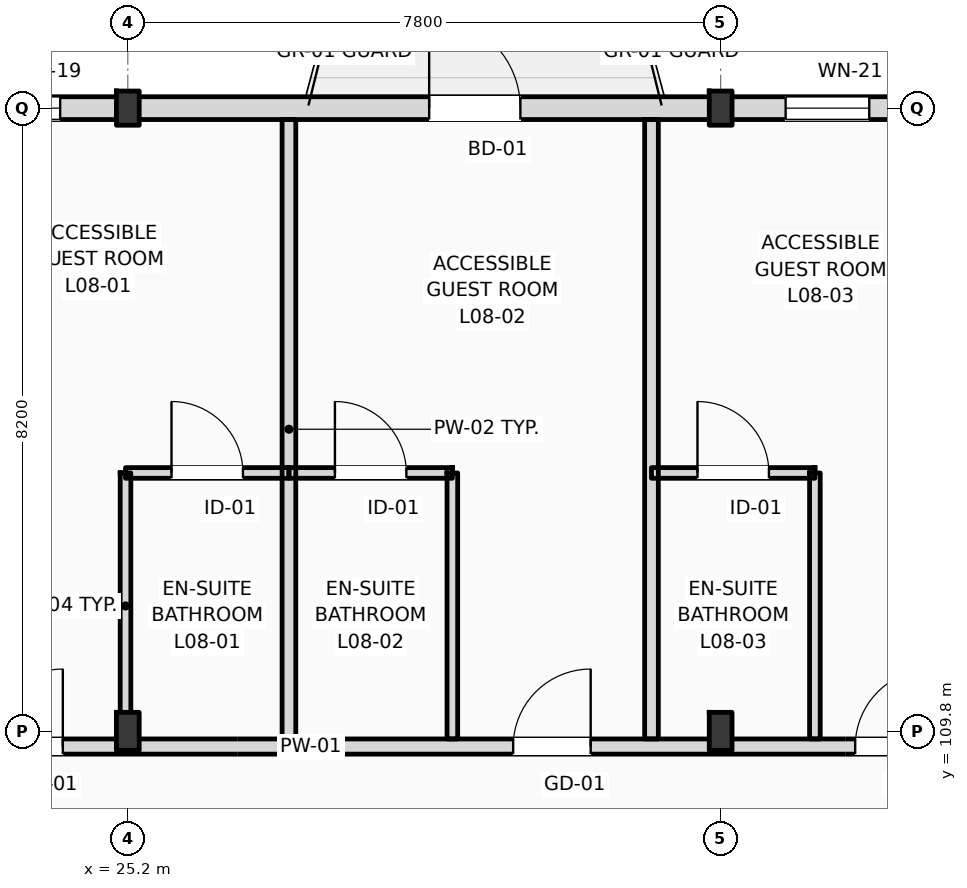
"""IFC4 building model, lengths in metres.
Left out: names, types, materials, properties, quantities, classifications, styles, units other than length and angle.
Written with IfcOpenShell. Run it as: python <this file> out.ifc"""

import sys

from ifc_helpers import new_model, si_unit, direction, frame, frame_2d, origin, origin_2d, place, context, subcontext, project, spatial, rectangle, i_section, extrude, element, fill, save


model = new_model("IFC4")
c1 = context("Model", 3, precision=1e-05, world=origin(), true_north=direction((0.0, 1.0)))
c2 = subcontext(c1, "Body", "Model", "MODEL_VIEW")
j1 = project(units=[si_unit("LENGTHUNIT", "METRE"), si_unit("PLANEANGLEUNIT", "RADIAN")], contexts=[c1])
p1 = place(None, origin())
s1 = spatial("IfcSite", under=j1, at=p1, CompositionType="ELEMENT")
p2 = place(p1, origin())
s2 = spatial("IfcBuilding", under=s1, at=p2, CompositionType="ELEMENT")
p3 = place(p2, frame((0.0, 0.0, 35.4)))
s3 = spatial("IfcBuildingStorey", under=s2, at=p3, CompositionType="ELEMENT", Elevation=35.4)
p4 = place(p3, frame((25.2, 109.8, 0.0), z_axis=(0.0, 0.0, 1.0), x_axis=(1.0, 0.0, 0.0)))
e1 = element("IfcColumn", 1, at=p4, inside=s3, PredefinedType="COLUMN", context=c2, shape_type="SweptSolid", body=[
    extrude(i_section(OverallWidth=0.3, OverallDepth=0.5, WebThickness=0.014, FlangeThickness=0.028, FilletRadius=0.027, at=origin_2d()), origin(), (0.0, 0.0, 1.0), 3.6),
])
p5 = place(p3, frame((25.2, 118.0, 0.0), z_axis=(0.0, 0.0, 1.0), x_axis=(1.0, 0.0, 0.0)))
e2 = element("IfcColumn", 2, at=p5, inside=s3, PredefinedType="COLUMN", context=c2, shape_type="SweptSolid", body=[
    extrude(i_section(OverallWidth=0.3, OverallDepth=0.45, WebThickness=0.014, FlangeThickness=0.026, FilletRadius=0.027, at=origin_2d()), origin(), (0.0, 0.0, 1.0), 3.6),
])
p6 = place(p3, frame((33.0, 109.8, 0.0), z_axis=(0.0, 0.0, 1.0), x_axis=(1.0, 0.0, 0.0)))
e3 = element("IfcColumn", 3, at=p6, inside=s3, PredefinedType="COLUMN", context=c2, shape_type="SweptSolid", body=[
    extrude(i_section(OverallWidth=0.3, OverallDepth=0.5, WebThickness=0.014, FlangeThickness=0.028, FilletRadius=0.027, at=origin_2d()), origin(), (0.0, 0.0, 1.0), 3.6),
])
p7 = place(p3, frame((33.0, 118.0, 0.0), z_axis=(0.0, 0.0, 1.0), x_axis=(1.0, 0.0, 0.0)))
e4 = element("IfcColumn", 4, at=p7, inside=s3, PredefinedType="COLUMN", context=c2, shape_type="SweptSolid", body=[
    extrude(i_section(OverallWidth=0.3, OverallDepth=0.45, WebThickness=0.014, FlangeThickness=0.026, FilletRadius=0.027, at=origin_2d()), origin(), (0.0, 0.0, 1.0), 3.6),
])
p8 = place(p3, frame((22.5, 118.0, 0.0), z_axis=(0.0, 0.0, 1.0), x_axis=(1.0, 0.0, 0.0)))
e5 = element("IfcWall", 5, at=p8, inside=s3, PredefinedType="STANDARD", context=c2, shape_type="SweptSolid", body=[
    extrude(rectangle(XDim=72.9, YDim=0.3, at=frame_2d((36.45, 0.0))), origin(), (0.0, 0.0, 1.0), 2.92),
])
p9 = place(p8, frame((0.91, 0.0, 0.9)))
e6 = element("IfcOpeningElement", 6, at=p9, cuts=e5, PredefinedType="OPENING", context=c2, shape_type="SweptSolid", body=[
    extrude(rectangle(XDim=0.9, YDim=1.84, at=frame_2d((0.45, 0.92))), frame((0.0, 0.16, 0.0), z_axis=(0.0, -1.0, 0.0), x_axis=(1.0, 0.0, 0.0)), (0.0, 0.0, 1.0), 0.32),
])
p10 = place(p8, frame((6.665, 0.0, 0.0)))
e7 = element("IfcOpeningElement", 7, at=p10, cuts=e5, PredefinedType="OPENING", context=c2, shape_type="SweptSolid", body=[
    extrude(rectangle(XDim=1.2, YDim=2.25, at=frame_2d((0.6, 1.125))), frame((0.0, 0.16, 0.0), z_axis=(0.0, -1.0, 0.0), x_axis=(1.0, 0.0, 0.0)), (0.0, 0.0, 1.0), 0.32),
])
p11 = place(p8, frame((11.355, 0.0, 0.9)))
e8 = element("IfcOpeningElement", 8, at=p11, cuts=e5, PredefinedType="OPENING", context=c2, shape_type="SweptSolid", body=[
    extrude(rectangle(XDim=1.1, YDim=1.5, at=frame_2d((0.55, 0.75))), frame((0.0, 0.16, 0.0), z_axis=(0.0, -1.0, 0.0), x_axis=(1.0, 0.0, 0.0)), (0.0, 0.0, 1.0), 0.32),
])
p12 = place(p8, frame((15.58, 0.0, 0.9)))
e9 = element("IfcOpeningElement", 9, at=p12, cuts=e5, PredefinedType="OPENING", context=c2, shape_type="SweptSolid", body=[
    extrude(rectangle(XDim=1.25, YDim=1.6, at=frame_2d((0.625, 0.8))), frame((0.0, 0.16, 0.0), z_axis=(0.0, -1.0, 0.0), x_axis=(1.0, 0.0, 0.0)), (0.0, 0.0, 1.0), 0.32),
])
p13 = place(p8, frame((21.08, 0.0, 0.0)))
e10 = element("IfcOpeningElement", 10, at=p13, cuts=e5, PredefinedType="OPENING", context=c2, shape_type="SweptSolid", body=[
    extrude(rectangle(XDim=1.2, YDim=2.25, at=frame_2d((0.6, 1.125))), frame((0.0, 0.16, 0.0), z_axis=(0.0, -1.0, 0.0), x_axis=(1.0, 0.0, 0.0)), (0.0, 0.0, 1.0), 0.32),
])
p14 = place(p8, frame((23.54, 0.0, 0.0)))
e11 = element("IfcOpeningElement", 11, at=p14, cuts=e5, PredefinedType="OPENING", context=c2, shape_type="SweptSolid", body=[
    extrude(rectangle(XDim=1.2, YDim=2.25, at=frame_2d((0.6, 1.125))), frame((0.0, 0.16, 0.0), z_axis=(0.0, -1.0, 0.0), x_axis=(1.0, 0.0, 0.0)), (0.0, 0.0, 1.0), 0.32),
])
p15 = place(p8, frame((28.83, 0.0, 0.9)))
e12 = element("IfcOpeningElement", 12, at=p15, cuts=e5, PredefinedType="OPENING", context=c2, shape_type="SweptSolid", body=[
    extrude(rectangle(XDim=1.75, YDim=1.84, at=frame_2d((0.875, 0.92))), frame((0.0, 0.16, 0.0), z_axis=(0.0, -1.0, 0.0), x_axis=(1.0, 0.0, 0.0)), (0.0, 0.0, 1.0), 0.32),
])
p16 = place(p8, frame((34.805, 0.0, 0.9)))
e13 = element("IfcOpeningElement", 13, at=p16, cuts=e5, PredefinedType="OPENING", context=c2, shape_type="SweptSolid", body=[
    extrude(rectangle(XDim=1.35, YDim=1.84, at=frame_2d((0.675, 0.92))), frame((0.0, 0.16, 0.0), z_axis=(0.0, -1.0, 0.0), x_axis=(1.0, 0.0, 0.0)), (0.0, 0.0, 1.0), 0.32),
])
p17 = place(p8, frame((38.105, 0.0, 0.0)))
e14 = element("IfcOpeningElement", 14, at=p17, cuts=e5, PredefinedType="OPENING", context=c2, shape_type="SweptSolid", body=[
    extrude(rectangle(XDim=1.2, YDim=2.25, at=frame_2d((0.6, 1.125))), frame((0.0, 0.16, 0.0), z_axis=(0.0, -1.0, 0.0), x_axis=(1.0, 0.0, 0.0)), (0.0, 0.0, 1.0), 0.32),
])
p18 = place(p8, frame((42.505, 0.0, 0.9)))
e15 = element("IfcOpeningElement", 15, at=p18, cuts=e5, PredefinedType="OPENING", context=c2, shape_type="SweptSolid", body=[
    extrude(rectangle(XDim=2.6, YDim=1.84, at=frame_2d((1.3, 0.92))), frame((0.0, 0.16, 0.0), z_axis=(0.0, -1.0, 0.0), x_axis=(1.0, 0.0, 0.0)), (0.0, 0.0, 1.0), 0.32),
])
p19 = place(p8, frame((46.2, 0.0, 0.9)))
e16 = element("IfcOpeningElement", 16, at=p19, cuts=e5, PredefinedType="OPENING", context=c2, shape_type="SweptSolid", body=[
    extrude(rectangle(XDim=1.8, YDim=1.84, at=frame_2d((0.9, 0.92))), frame((0.0, 0.16, 0.0), z_axis=(0.0, -1.0, 0.0), x_axis=(1.0, 0.0, 0.0)), (0.0, 0.0, 1.0), 0.32),
])
p20 = place(p8, frame((52.565, 0.0, 0.0)))
e17 = element("IfcOpeningElement", 17, at=p20, cuts=e5, PredefinedType="OPENING", context=c2, shape_type="SweptSolid", body=[
    extrude(rectangle(XDim=1.2, YDim=2.25, at=frame_2d((0.6, 1.125))), frame((0.0, 0.16, 0.0), z_axis=(0.0, -1.0, 0.0), x_axis=(1.0, 0.0, 0.0)), (0.0, 0.0, 1.0), 0.32),
])
p21 = place(p8, frame((55.305, 0.0, 0.9)))
e18 = element("IfcOpeningElement", 18, at=p21, cuts=e5, PredefinedType="OPENING", context=c2, shape_type="SweptSolid", body=[
    extrude(rectangle(XDim=1.2, YDim=1.8, at=frame_2d((0.6, 0.9))), frame((0.0, 0.16, 0.0), z_axis=(0.0, -1.0, 0.0), x_axis=(1.0, 0.0, 0.0)), (0.0, 0.0, 1.0), 0.32),
])
p22 = place(p8, frame((60.53, 0.0, 0.9)))
e19 = element("IfcOpeningElement", 19, at=p22, cuts=e5, PredefinedType="OPENING", context=c2, shape_type="SweptSolid", body=[
    extrude(rectangle(XDim=1.35, YDim=1.84, at=frame_2d((0.675, 0.92))), frame((0.0, 0.16, 0.0), z_axis=(0.0, -1.0, 0.0), x_axis=(1.0, 0.0, 0.0)), (0.0, 0.0, 1.0), 0.32),
])
p23 = place(p8, frame((65.955, 0.0, 0.9)))
e20 = element("IfcOpeningElement", 20, at=p23, cuts=e5, PredefinedType="OPENING", context=c2, shape_type="SweptSolid", body=[
    extrude(rectangle(XDim=1.35, YDim=1.84, at=frame_2d((0.675, 0.92))), frame((0.0, 0.16, 0.0), z_axis=(0.0, -1.0, 0.0), x_axis=(1.0, 0.0, 0.0)), (0.0, 0.0, 1.0), 0.32),
])
p24 = place(p8, frame((69.335, 0.0, 0.9)))
e21 = element("IfcOpeningElement", 21, at=p24, cuts=e5, PredefinedType="OPENING", context=c2, shape_type="SweptSolid", body=[
    extrude(rectangle(XDim=1.65, YDim=1.84, at=frame_2d((0.825, 0.92))), frame((0.0, 0.16, 0.0), z_axis=(0.0, -1.0, 0.0), x_axis=(1.0, 0.0, 0.0)), (0.0, 0.0, 1.0), 0.32),
])
p25 = place(p3, frame((10.65, 109.6, 0.0), z_axis=(0.0, 0.0, 1.0), x_axis=(1.0, 0.0, 0.0)))
e22 = element("IfcWall", 22, at=p25, inside=s3, PredefinedType="PARTITIONING", context=c2, shape_type="SweptSolid", body=[
    extrude(rectangle(XDim=84.61, YDim=0.2, at=frame_2d((42.305, 0.0))), origin(), (0.0, 0.0, 1.0), 2.82),
])
p26 = place(p25, frame((12.675, 0.0, 0.0)))
e23 = element("IfcOpeningElement", 23, at=p26, cuts=e22, PredefinedType="OPENING", context=c2, shape_type="SweptSolid", body=[
    extrude(rectangle(XDim=1.02, YDim=2.2, at=frame_2d((0.51, 1.1))), frame((0.0, 0.11, 0.0), z_axis=(0.0, -1.0, 0.0), x_axis=(1.0, 0.0, 0.0)), (0.0, 0.0, 1.0), 0.22),
])
p27 = place(p25, frame((19.62, 0.0, 0.0)))
e24 = element("IfcOpeningElement", 24, at=p27, cuts=e22, PredefinedType="OPENING", context=c2, shape_type="SweptSolid", body=[
    extrude(rectangle(XDim=1.02, YDim=2.2, at=frame_2d((0.51, 1.1))), frame((0.0, 0.11, 0.0), z_axis=(0.0, -1.0, 0.0), x_axis=(1.0, 0.0, 0.0)), (0.0, 0.0, 1.0), 0.22),
])
p28 = place(p25, frame((24.12, 0.0, 0.0)))
e25 = element("IfcOpeningElement", 25, at=p28, cuts=e22, PredefinedType="OPENING", context=c2, shape_type="SweptSolid", body=[
    extrude(rectangle(XDim=1.02, YDim=2.2, at=frame_2d((0.51, 1.1))), frame((0.0, 0.11, 0.0), z_axis=(0.0, -1.0, 0.0), x_axis=(1.0, 0.0, 0.0)), (0.0, 0.0, 1.0), 0.22),
])
p29 = place(p25, frame((26.47, 0.0, 0.0)))
e26 = element("IfcOpeningElement", 26, at=p29, cuts=e22, PredefinedType="OPENING", context=c2, shape_type="SweptSolid", body=[
    extrude(rectangle(XDim=1.02, YDim=2.2, at=frame_2d((0.51, 1.1))), frame((0.0, 0.11, 0.0), z_axis=(0.0, -1.0, 0.0), x_axis=(1.0, 0.0, 0.0)), (0.0, 0.0, 1.0), 0.22),
])
p30 = place(p25, frame((33.15, 0.0, 0.0)))
e27 = element("IfcOpeningElement", 27, at=p30, cuts=e22, PredefinedType="OPENING", context=c2, shape_type="SweptSolid", body=[
    extrude(rectangle(XDim=0.96, YDim=2.2, at=frame_2d((0.48, 1.1))), frame((0.0, 0.11, 0.0), z_axis=(0.0, -1.0, 0.0), x_axis=(1.0, 0.0, 0.0)), (0.0, 0.0, 1.0), 0.22),
])
p31 = place(p25, frame((35.5, 0.0, 0.0)))
e28 = element("IfcOpeningElement", 28, at=p31, cuts=e22, PredefinedType="OPENING", context=c2, shape_type="SweptSolid", body=[
    extrude(rectangle(XDim=0.96, YDim=2.2, at=frame_2d((0.48, 1.1))), frame((0.0, 0.11, 0.0), z_axis=(0.0, -1.0, 0.0), x_axis=(1.0, 0.0, 0.0)), (0.0, 0.0, 1.0), 0.22),
])
p32 = place(p25, frame((42.15, 0.0, 0.0)))
e29 = element("IfcOpeningElement", 29, at=p32, cuts=e22, PredefinedType="OPENING", context=c2, shape_type="SweptSolid", body=[
    extrude(rectangle(XDim=0.96, YDim=2.2, at=frame_2d((0.48, 1.1))), frame((0.0, 0.11, 0.0), z_axis=(0.0, -1.0, 0.0), x_axis=(1.0, 0.0, 0.0)), (0.0, 0.0, 1.0), 0.22),
])
p33 = place(p25, frame((47.15, 0.0, 0.0)))
e30 = element("IfcOpeningElement", 30, at=p33, cuts=e22, PredefinedType="OPENING", context=c2, shape_type="SweptSolid", body=[
    extrude(rectangle(XDim=0.96, YDim=2.2, at=frame_2d((0.48, 1.1))), frame((0.0, 0.11, 0.0), z_axis=(0.0, -1.0, 0.0), x_axis=(1.0, 0.0, 0.0)), (0.0, 0.0, 1.0), 0.22),
])
p34 = place(p25, frame((51.15, 0.0, 0.0)))
e31 = element("IfcOpeningElement", 31, at=p34, cuts=e22, PredefinedType="OPENING", context=c2, shape_type="SweptSolid", body=[
    extrude(rectangle(XDim=0.96, YDim=2.2, at=frame_2d((0.48, 1.1))), frame((0.0, 0.11, 0.0), z_axis=(0.0, -1.0, 0.0), x_axis=(1.0, 0.0, 0.0)), (0.0, 0.0, 1.0), 0.22),
])
p35 = place(p25, frame((55.65, 0.0, 0.0)))
e32 = element("IfcOpeningElement", 32, at=p35, cuts=e22, PredefinedType="OPENING", context=c2, shape_type="SweptSolid", body=[
    extrude(rectangle(XDim=0.96, YDim=2.2, at=frame_2d((0.48, 1.1))), frame((0.0, 0.11, 0.0), z_axis=(0.0, -1.0, 0.0), x_axis=(1.0, 0.0, 0.0)), (0.0, 0.0, 1.0), 0.22),
])
p36 = place(p25, frame((58.0, 0.0, 0.0)))
e33 = element("IfcOpeningElement", 33, at=p36, cuts=e22, PredefinedType="OPENING", context=c2, shape_type="SweptSolid", body=[
    extrude(rectangle(XDim=0.96, YDim=2.2, at=frame_2d((0.48, 1.1))), frame((0.0, 0.11, 0.0), z_axis=(0.0, -1.0, 0.0), x_axis=(1.0, 0.0, 0.0)), (0.0, 0.0, 1.0), 0.22),
])
p37 = place(p25, frame((64.65, 0.0, 0.0)))
e34 = element("IfcOpeningElement", 34, at=p37, cuts=e22, PredefinedType="OPENING", context=c2, shape_type="SweptSolid", body=[
    extrude(rectangle(XDim=0.96, YDim=2.2, at=frame_2d((0.48, 1.1))), frame((0.0, 0.11, 0.0), z_axis=(0.0, -1.0, 0.0), x_axis=(1.0, 0.0, 0.0)), (0.0, 0.0, 1.0), 0.22),
])
p38 = place(p25, frame((66.75, 0.0, 0.0)))
e35 = element("IfcOpeningElement", 35, at=p38, cuts=e22, PredefinedType="OPENING", context=c2, shape_type="SweptSolid", body=[
    extrude(rectangle(XDim=0.96, YDim=2.2, at=frame_2d((0.48, 1.1))), frame((0.0, 0.11, 0.0), z_axis=(0.0, -1.0, 0.0), x_axis=(1.0, 0.0, 0.0)), (0.0, 0.0, 1.0), 0.22),
])
p39 = place(p25, frame((73.65, 0.0, 0.0)))
e36 = element("IfcOpeningElement", 36, at=p39, cuts=e22, PredefinedType="OPENING", context=c2, shape_type="SweptSolid", body=[
    extrude(rectangle(XDim=0.96, YDim=2.2, at=frame_2d((0.48, 1.1))), frame((0.0, 0.11, 0.0), z_axis=(0.0, -1.0, 0.0), x_axis=(1.0, 0.0, 0.0)), (0.0, 0.0, 1.0), 0.22),
])
p40 = place(p25, frame((78.4, 0.0, 0.0)))
e37 = element("IfcOpeningElement", 37, at=p40, cuts=e22, PredefinedType="OPENING", context=c2, shape_type="SweptSolid", body=[
    extrude(rectangle(XDim=0.96, YDim=2.2, at=frame_2d((0.48, 1.1))), frame((0.0, 0.11, 0.0), z_axis=(0.0, -1.0, 0.0), x_axis=(1.0, 0.0, 0.0)), (0.0, 0.0, 1.0), 0.22),
])
p41 = place(p25, frame((80.455, 0.0, 0.0)))
e38 = element("IfcOpeningElement", 38, at=p41, cuts=e22, PredefinedType="OPENING", context=c2, shape_type="SweptSolid", body=[
    extrude(rectangle(XDim=0.96, YDim=2.2, at=frame_2d((0.48, 1.1))), frame((0.0, 0.11, 0.0), z_axis=(0.0, -1.0, 0.0), x_axis=(1.0, 0.0, 0.0)), (0.0, 0.0, 1.0), 0.22),
])
p42 = place(p25, frame((2.716, 0.0, 0.0)))
e39 = element("IfcOpeningElement", 39, at=p42, cuts=e22, PredefinedType="OPENING", context=c2, shape_type="SweptSolid", body=[
    extrude(rectangle(XDim=1.35, YDim=2.25, at=frame_2d((0.675, 1.125))), frame((0.0, 0.11, 0.0), z_axis=(0.0, -1.0, 0.0), x_axis=(1.0, 0.0, 0.0)), (0.0, 0.0, 1.0), 0.22),
])
p43 = place(p25, frame((6.65, 0.0, 0.0)))
e40 = element("IfcOpeningElement", 40, at=p43, cuts=e22, PredefinedType="OPENING", context=c2, shape_type="SweptSolid", body=[
    extrude(rectangle(XDim=1.35, YDim=2.25, at=frame_2d((0.675, 1.125))), frame((0.0, 0.11, 0.0), z_axis=(0.0, -1.0, 0.0), x_axis=(1.0, 0.0, 0.0)), (0.0, 0.0, 1.0), 0.22),
])
p44 = place(p25, frame((10.583, 0.0, 0.0)))
e41 = element("IfcOpeningElement", 41, at=p44, cuts=e22, PredefinedType="OPENING", context=c2, shape_type="SweptSolid", body=[
    extrude(rectangle(XDim=1.35, YDim=2.25, at=frame_2d((0.675, 1.125))), frame((0.0, 0.11, 0.0), z_axis=(0.0, -1.0, 0.0), x_axis=(1.0, 0.0, 0.0)), (0.0, 0.0, 1.0), 0.22),
])
p45 = place(p3, frame((27.32, 109.7, 0.0), z_axis=(0.0, 0.0, 1.0), x_axis=(0.0, 1.0, 0.0)))
e42 = element("IfcWall", 42, at=p45, inside=s3, PredefinedType="PARTITIONING", context=c2, shape_type="SweptSolid", body=[
    extrude(rectangle(XDim=8.15, YDim=0.18, at=frame_2d((4.075, 0.0))), origin(), (0.0, 0.0, 1.0), 3.38),
])
p46 = place(p3, frame((25.17, 109.7, 0.0), z_axis=(0.0, 0.0, 1.0), x_axis=(0.0, 1.0, 0.0)))
e43 = element("IfcWall", 43, at=p46, inside=s3, PredefinedType="PARTITIONING", context=c2, shape_type="SweptSolid", body=[
    extrude(rectangle(XDim=3.5, YDim=0.14, at=frame_2d((1.75, 0.0))), origin(), (0.0, 0.0, 1.0), 3.01),
])
p47 = place(p3, frame((25.17, 113.2, 0.0), z_axis=(0.0, 0.0, 1.0), x_axis=(1.0, 0.0, 0.0)))
e44 = element("IfcWall", 44, at=p47, inside=s3, PredefinedType="PARTITIONING", context=c2, shape_type="SweptSolid", body=[
    extrude(rectangle(XDim=2.15, YDim=0.14, at=frame_2d((1.075, 0.0))), origin(), (0.0, 0.0, 1.0), 3.38),
])
p48 = place(p47, frame((0.605, 0.0, 0.0)))
e45 = element("IfcOpeningElement", 45, at=p48, cuts=e44, PredefinedType="OPENING", context=c2, shape_type="SweptSolid", body=[
    extrude(rectangle(XDim=0.94, YDim=2.15, at=frame_2d((0.47, 1.075))), frame((0.0, 0.08, 0.0), z_axis=(0.0, -1.0, 0.0), x_axis=(1.0, 0.0, 0.0)), (0.0, 0.0, 1.0), 0.16),
])
p49 = place(p3, frame((32.09, 109.7, 0.0), z_axis=(0.0, 0.0, 1.0), x_axis=(0.0, 1.0, 0.0)))
e46 = element("IfcWall", 46, at=p49, inside=s3, PredefinedType="PARTITIONING", context=c2, shape_type="SweptSolid", body=[
    extrude(rectangle(XDim=8.15, YDim=0.18, at=frame_2d((4.075, 0.0))), origin(), (0.0, 0.0, 1.0), 3.38),
])
p50 = place(p3, frame((29.47, 109.7, 0.0), z_axis=(0.0, 0.0, 1.0), x_axis=(0.0, 1.0, 0.0)))
e47 = element("IfcWall", 47, at=p50, inside=s3, PredefinedType="PARTITIONING", context=c2, shape_type="SweptSolid", body=[
    extrude(rectangle(XDim=3.5, YDim=0.14, at=frame_2d((1.75, 0.0))), origin(), (0.0, 0.0, 1.0), 3.38),
])
p51 = place(p3, frame((27.32, 113.2, 0.0), z_axis=(0.0, 0.0, 1.0), x_axis=(1.0, 0.0, 0.0)))
e48 = element("IfcWall", 48, at=p51, inside=s3, PredefinedType="PARTITIONING", context=c2, shape_type="SweptSolid", body=[
    extrude(rectangle(XDim=2.15, YDim=0.14, at=frame_2d((1.075, 0.0))), origin(), (0.0, 0.0, 1.0), 3.38),
])
p52 = place(p51, frame((0.605, 0.0, 0.0)))
e49 = element("IfcOpeningElement", 49, at=p52, cuts=e48, PredefinedType="OPENING", context=c2, shape_type="SweptSolid", body=[
    extrude(rectangle(XDim=0.94, YDim=2.15, at=frame_2d((0.47, 1.075))), frame((0.0, 0.08, 0.0), z_axis=(0.0, -1.0, 0.0), x_axis=(1.0, 0.0, 0.0)), (0.0, 0.0, 1.0), 0.16),
])
p53 = place(p3, frame((34.24, 109.7, 0.0), z_axis=(0.0, 0.0, 1.0), x_axis=(0.0, 1.0, 0.0)))
e50 = element("IfcWall", 50, at=p53, inside=s3, PredefinedType="PARTITIONING", context=c2, shape_type="SweptSolid", body=[
    extrude(rectangle(XDim=3.5, YDim=0.14, at=frame_2d((1.75, 0.0))), origin(), (0.0, 0.0, 1.0), 3.38),
])
p54 = place(p3, frame((32.09, 113.2, 0.0), z_axis=(0.0, 0.0, 1.0), x_axis=(1.0, 0.0, 0.0)))
e51 = element("IfcWall", 51, at=p54, inside=s3, PredefinedType="PARTITIONING", context=c2, shape_type="SweptSolid", body=[
    extrude(rectangle(XDim=2.15, YDim=0.14, at=frame_2d((1.075, 0.0))), origin(), (0.0, 0.0, 1.0), 3.38),
])
p55 = place(p54, frame((0.605, 0.0, 0.0)))
e52 = element("IfcOpeningElement", 52, at=p55, cuts=e51, PredefinedType="OPENING", context=c2, shape_type="SweptSolid", body=[
    extrude(rectangle(XDim=0.94, YDim=2.15, at=frame_2d((0.47, 1.075))), frame((0.0, 0.08, 0.0), z_axis=(0.0, -1.0, 0.0), x_axis=(1.0, 0.0, 0.0)), (0.0, 0.0, 1.0), 0.16),
])
p56 = place(p9, origin())
e53 = element("IfcWindow", 53, at=p56, inside=s3, PartitioningType="DOUBLE_PANEL_VERTICAL", PredefinedType="WINDOW", context=c2, shape_type="SweptSolid", body=[
    extrude(rectangle(XDim=0.9, YDim=1.84, at=frame_2d((0.45, 0.92))), frame((0.0, 0.03, 0.0), z_axis=(0.0, -1.0, 0.0), x_axis=(1.0, 0.0, 0.0)), (0.0, 0.0, 1.0), 0.06),
])
fill(e6, e53)
p57 = place(p10, origin())
e54 = element("IfcDoor", 54, at=p57, inside=s3, OperationType="SINGLE_SWING_LEFT", PredefinedType="DOOR", context=c2, shape_type="SweptSolid", body=[
    extrude(rectangle(XDim=1.2, YDim=2.25, at=frame_2d((0.6, 1.125))), frame((0.0, 0.025, 0.0), z_axis=(0.0, -1.0, 0.0), x_axis=(1.0, 0.0, 0.0)), (0.0, 0.0, 1.0), 0.05),
])
fill(e7, e54)
p58 = place(p11, origin())
e55 = element("IfcWindow", 55, at=p58, inside=s3, PartitioningType="DOUBLE_PANEL_VERTICAL", PredefinedType="WINDOW", context=c2, shape_type="SweptSolid", body=[
    extrude(rectangle(XDim=1.1, YDim=1.5, at=frame_2d((0.55, 0.75))), frame((0.0, 0.03, 0.0), z_axis=(0.0, -1.0, 0.0), x_axis=(1.0, 0.0, 0.0)), (0.0, 0.0, 1.0), 0.06),
])
fill(e8, e55)
p59 = place(p26, origin())
e56 = element("IfcDoor", 56, at=p59, inside=s3, OperationType="SINGLE_SWING_RIGHT", PredefinedType="DOOR", context=c2, shape_type="SweptSolid", body=[
    extrude(rectangle(XDim=1.02, YDim=2.2, at=frame_2d((0.51, 1.1))), frame((0.0, 0.025, 0.0), z_axis=(0.0, -1.0, 0.0), x_axis=(1.0, 0.0, 0.0)), (0.0, 0.0, 1.0), 0.05),
])
fill(e23, e56)
p60 = place(p48, origin())
e57 = element("IfcDoor", 57, at=p60, inside=s3, OperationType="SINGLE_SWING_LEFT", PredefinedType="DOOR", context=c2, shape_type="SweptSolid", body=[
    extrude(rectangle(XDim=0.94, YDim=2.15, at=frame_2d((0.47, 1.075))), frame((0.0, 0.025, 0.0), z_axis=(0.0, -1.0, 0.0), x_axis=(1.0, 0.0, 0.0)), (0.0, 0.0, 1.0), 0.05),
])
fill(e45, e57)
p61 = place(p27, origin())
e58 = element("IfcDoor", 58, at=p61, inside=s3, OperationType="SINGLE_SWING_RIGHT", PredefinedType="DOOR", context=c2, shape_type="SweptSolid", body=[
    extrude(rectangle(XDim=1.02, YDim=2.2, at=frame_2d((0.51, 1.1))), frame((0.0, 0.025, 0.0), z_axis=(0.0, -1.0, 0.0), x_axis=(1.0, 0.0, 0.0)), (0.0, 0.0, 1.0), 0.05),
])
fill(e24, e58)
p62 = place(p52, origin())
e59 = element("IfcDoor", 59, at=p62, inside=s3, OperationType="SINGLE_SWING_LEFT", PredefinedType="DOOR", context=c2, shape_type="SweptSolid", body=[
    extrude(rectangle(XDim=0.94, YDim=2.15, at=frame_2d((0.47, 1.075))), frame((0.0, 0.025, 0.0), z_axis=(0.0, -1.0, 0.0), x_axis=(1.0, 0.0, 0.0)), (0.0, 0.0, 1.0), 0.05),
])
fill(e49, e59)
p63 = place(p28, origin())
e60 = element("IfcDoor", 60, at=p63, inside=s3, OperationType="SINGLE_SWING_RIGHT", PredefinedType="DOOR", context=c2, shape_type="SweptSolid", body=[
    extrude(rectangle(XDim=1.02, YDim=2.2, at=frame_2d((0.51, 1.1))), frame((0.0, 0.025, 0.0), z_axis=(0.0, -1.0, 0.0), x_axis=(1.0, 0.0, 0.0)), (0.0, 0.0, 1.0), 0.05),
])
fill(e25, e60)
p64 = place(p55, origin())
e61 = element("IfcDoor", 61, at=p64, inside=s3, OperationType="SINGLE_SWING_LEFT", PredefinedType="DOOR", context=c2, shape_type="SweptSolid", body=[
    extrude(rectangle(XDim=0.94, YDim=2.15, at=frame_2d((0.47, 1.075))), frame((0.0, 0.025, 0.0), z_axis=(0.0, -1.0, 0.0), x_axis=(1.0, 0.0, 0.0)), (0.0, 0.0, 1.0), 0.05),
])
fill(e52, e61)
save(model, sys.argv[1])
